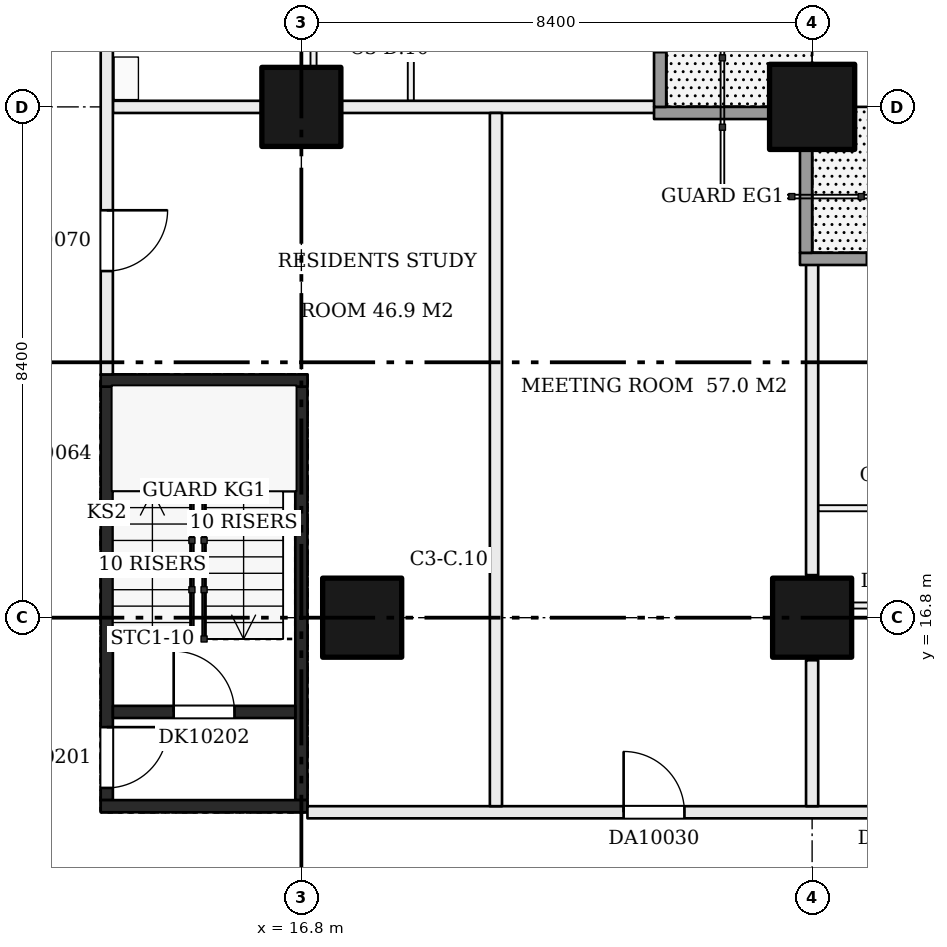
"""IFC4 building model, lengths in metres.
Left out: names, types, materials, properties, quantities, classifications, styles, units other than length and angle.
Written with IfcOpenShell. Run it as: python <this file> out.ifc"""

import sys

from ifc_helpers import new_model, si_unit, direction, frame, frame_2d, origin, origin_2d, place, context, subcontext, project, spatial, rectangle, extrude, element, fill, save


model = new_model("IFC4")
c1 = context("Model", 3, precision=1e-05, world=origin(), true_north=direction((0.0, 1.0)))
c2 = subcontext(c1, "Body", "Model", "MODEL_VIEW")
j1 = project(units=[si_unit("LENGTHUNIT", "METRE"), si_unit("PLANEANGLEUNIT", "RADIAN")], contexts=[c1])
p1 = place(None, origin())
s1 = spatial("IfcSite", under=j1, at=p1, CompositionType="ELEMENT")
p2 = place(p1, origin())
s2 = spatial("IfcBuilding", under=s1, at=p2, CompositionType="ELEMENT")
p3 = place(p2, frame((0.0, 0.0, 46.2)))
s3 = spatial("IfcBuildingStorey", under=s2, at=p3, CompositionType="ELEMENT", Elevation=46.2)
for number, where, z_axis, x_axis in (
    (1, (17.8, 16.8, 0.0), (0.0, 0.0, 1.0), (1.0, 0.0, 0.0)),
    (2, (16.8, 25.2, 0.0), (0.0, 0.0, 1.0), (1.0, 0.0, 0.0)),
    (3, (25.2, 16.8, 0.0), (0.0, 0.0, 1.0), (1.0, 0.0, 0.0)),
):
    element("IfcColumn", number, at=place(p3, frame(where, z_axis=z_axis, x_axis=x_axis)), inside=s3, PredefinedType="COLUMN", context=c2, shape_type="SweptSolid", body=[
        extrude(rectangle(XDim=1.3, YDim=1.3, at=origin_2d()), origin(), (0.0, 0.0, 1.0), 3.22),
    ])
p4 = place(p3, frame((25.2, 25.2, 0.0), z_axis=(0.0, 0.0, 1.0), x_axis=(1.0, 0.0, 0.0)))
e4 = element("IfcColumn", 4, at=p4, inside=s3, PredefinedType="COLUMN", context=c2, shape_type="SweptSolid", body=[
    extrude(rectangle(XDim=1.4, YDim=1.4, at=origin_2d()), origin(), (0.0, 0.0, 1.0), 3.22),
])
p5 = place(p3, frame((13.6, 13.8, 0.0), z_axis=(0.0, 0.0, 1.0), x_axis=(0.0, 1.0, 0.0)))
e5 = element("IfcWall", 5, at=p5, inside=s3, PredefinedType="SHEAR", context=c2, shape_type="SweptSolid", body=[
    extrude(rectangle(XDim=6.8, YDim=0.2, at=frame_2d((3.4, 0.0))), origin(), (0.0, 0.0, 1.0), 3.22),
])
p6 = place(p5, frame((0.2, 0.0, 0.0)))
e6 = element("IfcOpeningElement", 6, at=p6, cuts=e5, PredefinedType="OPENING", context=c2, shape_type="SweptSolid", body=[
    extrude(rectangle(XDim=1.0, YDim=2.1, at=frame_2d((0.5, 1.05))), frame((0.0, 0.11, 0.0), z_axis=(0.0, -1.0, 0.0), x_axis=(1.0, 0.0, 0.0)), (0.0, 0.0, 1.0), 0.22),
])
p7 = place(p3, frame((16.8, 13.8, 0.0), z_axis=(0.0, 0.0, 1.0), x_axis=(0.0, 1.0, 0.0)))
e7 = element("IfcWall", 7, at=p7, inside=s3, PredefinedType="SHEAR", context=c2, shape_type="SweptSolid", body=[
    extrude(rectangle(XDim=6.8, YDim=0.2, at=frame_2d((3.4, 0.0))), origin(), (0.0, 0.0, 1.0), 3.22),
])
for number, where, z_axis, x_axis in (
    (8, (13.5, 13.7, 0.0), (0.0, 0.0, 1.0), (1.0, 0.0, 0.0)),
    (9, (13.5, 20.7, 0.0), (0.0, 0.0, 1.0), (1.0, 0.0, 0.0)),
):
    element("IfcWall", number, at=place(p3, frame(where, z_axis=z_axis, x_axis=x_axis)), inside=s3, PredefinedType="SHEAR", context=c2, shape_type="SweptSolid", body=[
        extrude(rectangle(XDim=3.4, YDim=0.2, at=frame_2d((1.7, 0.0))), origin(), (0.0, 0.0, 1.0), 3.22),
    ])
p8 = place(p3, frame((13.7, 15.25, 0.0), z_axis=(0.0, 0.0, 1.0), x_axis=(1.0, 0.0, 0.0)))
e10 = element("IfcWall", 10, at=p8, inside=s3, PredefinedType="SHEAR", context=c2, shape_type="SweptSolid", body=[
    extrude(rectangle(XDim=3.0, YDim=0.2, at=frame_2d((1.5, 0.0))), origin(), (0.0, 0.0, 1.0), 3.22),
])
p9 = place(p8, frame((1.0, 0.0, 0.0)))
e11 = element("IfcOpeningElement", 11, at=p9, cuts=e10, PredefinedType="OPENING", context=c2, shape_type="SweptSolid", body=[
    extrude(rectangle(XDim=1.0, YDim=2.1, at=frame_2d((0.5, 1.05))), frame((0.0, 0.11, 0.0), z_axis=(0.0, -1.0, 0.0), x_axis=(1.0, 0.0, 0.0)), (0.0, 0.0, 1.0), 0.22),
])
p10 = place(p3, frame((16.9, 13.6, 0.0), z_axis=(0.0, 0.0, 1.0), x_axis=(1.0, 0.0, 0.0)))
e12 = element("IfcWall", 12, at=p10, inside=s3, PredefinedType="PARTITIONING", context=c2, shape_type="SweptSolid", body=[
    extrude(rectangle(XDim=25.1, YDim=0.2, at=frame_2d((12.55, 0.0))), origin(), (0.0, 0.0, 1.0), 3.22),
])
p11 = place(p10, frame((9.3, 0.0, 0.0)))
e13 = element("IfcOpeningElement", 13, at=p11, cuts=e12, PredefinedType="OPENING", context=c2, shape_type="SweptSolid", body=[
    extrude(rectangle(XDim=1.0, YDim=2.1, at=frame_2d((0.5, 1.05))), frame((0.0, 0.11, 0.0), z_axis=(0.0, -1.0, 0.0), x_axis=(1.0, 0.0, 0.0)), (0.0, 0.0, 1.0), 0.22),
])
p12 = place(p10, frame((21.4, 0.0, 0.0)))
e14 = element("IfcOpeningElement", 14, at=p12, cuts=e12, PredefinedType="OPENING", context=c2, shape_type="SweptSolid", body=[
    extrude(rectangle(XDim=1.0, YDim=2.1, at=frame_2d((0.5, 1.05))), frame((0.0, 0.11, 0.0), z_axis=(0.0, -1.0, 0.0), x_axis=(1.0, 0.0, 0.0)), (0.0, 0.0, 1.0), 0.22),
])
p13 = place(p10, frame((5.2, 0.0, 0.0)))
e15 = element("IfcOpeningElement", 15, at=p13, cuts=e12, PredefinedType="OPENING", context=c2, shape_type="SweptSolid", body=[
    extrude(rectangle(XDim=1.0, YDim=2.1, at=frame_2d((0.5, 1.05))), frame((0.0, 0.11, 0.0), z_axis=(0.0, -1.0, 0.0), x_axis=(1.0, 0.0, 0.0)), (0.0, 0.0, 1.0), 0.22),
])
p14 = place(p3, frame((25.3, 17.0, 0.0), z_axis=(0.0, 0.0, 1.0), x_axis=(1.0, 0.0, 0.0)))
e16 = element("IfcWall", 16, at=p14, inside=s3, PredefinedType="PARTITIONING", context=c2, shape_type="SweptSolid", body=[
    extrude(rectangle(XDim=12.4, YDim=0.1, at=frame_2d((6.2, 0.0))), origin(), (0.0, 0.0, 1.0), 3.22),
])
p15 = place(p14, frame((1.0, 0.0, 0.0)))
e17 = element("IfcOpeningElement", 17, at=p15, cuts=e16, PredefinedType="OPENING", context=c2, shape_type="SweptSolid", body=[
    extrude(rectangle(XDim=0.9, YDim=2.1, at=frame_2d((0.45, 1.05))), frame((0.0, 0.06, 0.0), z_axis=(0.0, -1.0, 0.0), x_axis=(1.0, 0.0, 0.0)), (0.0, 0.0, 1.0), 0.12),
])
p16 = place(p14, frame((4.0, 0.0, 0.0)))
e18 = element("IfcOpeningElement", 18, at=p16, cuts=e16, PredefinedType="OPENING", context=c2, shape_type="SweptSolid", body=[
    extrude(rectangle(XDim=0.9, YDim=2.1, at=frame_2d((0.45, 1.05))), frame((0.0, 0.06, 0.0), z_axis=(0.0, -1.0, 0.0), x_axis=(1.0, 0.0, 0.0)), (0.0, 0.0, 1.0), 0.12),
])
p17 = place(p14, frame((6.5, 0.0, 0.0)))
e19 = element("IfcOpeningElement", 19, at=p17, cuts=e16, PredefinedType="OPENING", context=c2, shape_type="SweptSolid", body=[
    extrude(rectangle(XDim=0.9, YDim=2.1, at=frame_2d((0.45, 1.05))), frame((0.0, 0.06, 0.0), z_axis=(0.0, -1.0, 0.0), x_axis=(1.0, 0.0, 0.0)), (0.0, 0.0, 1.0), 0.12),
])
p18 = place(p14, frame((10.7, 0.0, 0.0)))
e20 = element("IfcOpeningElement", 20, at=p18, cuts=e16, PredefinedType="OPENING", context=c2, shape_type="SweptSolid", body=[
    extrude(rectangle(XDim=0.9, YDim=2.1, at=frame_2d((0.45, 1.05))), frame((0.0, 0.06, 0.0), z_axis=(0.0, -1.0, 0.0), x_axis=(1.0, 0.0, 0.0)), (0.0, 0.0, 1.0), 0.12),
])
p19 = place(p3, frame((25.3, 18.6, 0.0), z_axis=(0.0, 0.0, 1.0), x_axis=(1.0, 0.0, 0.0)))
e21 = element("IfcWall", 21, at=p19, inside=s3, PredefinedType="PARTITIONING", context=c2, shape_type="SweptSolid", body=[
    extrude(rectangle(XDim=12.4, YDim=0.1, at=frame_2d((6.2, 0.0))), origin(), (0.0, 0.0, 1.0), 3.22),
])
p20 = place(p19, frame((1.5, 0.0, 0.0)))
e22 = element("IfcOpeningElement", 22, at=p20, cuts=e21, PredefinedType="OPENING", context=c2, shape_type="SweptSolid", body=[
    extrude(rectangle(XDim=0.9, YDim=2.1, at=frame_2d((0.45, 1.05))), frame((0.0, 0.06, 0.0), z_axis=(0.0, -1.0, 0.0), x_axis=(1.0, 0.0, 0.0)), (0.0, 0.0, 1.0), 0.12),
])
p21 = place(p19, frame((5.7, 0.0, 0.0)))
e23 = element("IfcOpeningElement", 23, at=p21, cuts=e21, PredefinedType="OPENING", context=c2, shape_type="SweptSolid", body=[
    extrude(rectangle(XDim=0.9, YDim=2.1, at=frame_2d((0.45, 1.05))), frame((0.0, 0.06, 0.0), z_axis=(0.0, -1.0, 0.0), x_axis=(1.0, 0.0, 0.0)), (0.0, 0.0, 1.0), 0.12),
])
p22 = place(p19, frame((9.9, 0.0, 0.0)))
e24 = element("IfcOpeningElement", 24, at=p22, cuts=e21, PredefinedType="OPENING", context=c2, shape_type="SweptSolid", body=[
    extrude(rectangle(XDim=0.9, YDim=2.1, at=frame_2d((0.45, 1.05))), frame((0.0, 0.06, 0.0), z_axis=(0.0, -1.0, 0.0), x_axis=(1.0, 0.0, 0.0)), (0.0, 0.0, 1.0), 0.12),
])
p23 = place(p3, frame((13.7, 25.2, 0.0), z_axis=(0.0, 0.0, 1.0), x_axis=(1.0, 0.0, 0.0)))
e25 = element("IfcWall", 25, at=p23, inside=s3, PredefinedType="PARTITIONING", context=c2, shape_type="SweptSolid", body=[
    extrude(rectangle(XDim=9.0, YDim=0.2, at=frame_2d((4.5, 0.0))), origin(), (0.0, 0.0, 1.0), 3.22),
])
p24 = place(p3, frame((13.6, 20.8, 0.0), z_axis=(0.0, 0.0, 1.0), x_axis=(0.0, 1.0, 0.0)))
e26 = element("IfcWall", 26, at=p24, inside=s3, PredefinedType="PARTITIONING", context=c2, shape_type="SweptSolid", body=[
    extrude(rectangle(XDim=21.2, YDim=0.2, at=frame_2d((10.6, 0.0))), origin(), (0.0, 0.0, 1.0), 3.22),
])
p25 = place(p24, frame((8.6, 0.0, 0.0)))
e27 = element("IfcOpeningElement", 27, at=p25, cuts=e26, PredefinedType="OPENING", context=c2, shape_type="SweptSolid", body=[
    extrude(rectangle(XDim=1.0, YDim=2.1, at=frame_2d((0.5, 1.05))), frame((0.0, 0.11, 0.0), z_axis=(0.0, -1.0, 0.0), x_axis=(1.0, 0.0, 0.0)), (0.0, 0.0, 1.0), 0.22),
])
p26 = place(p24, frame((19.74, 0.0, 0.0)))
e28 = element("IfcOpeningElement", 28, at=p26, cuts=e26, PredefinedType="OPENING", context=c2, shape_type="SweptSolid", body=[
    extrude(rectangle(XDim=1.0, YDim=2.1, at=frame_2d((0.5, 1.05))), frame((0.0, 0.11, 0.0), z_axis=(0.0, -1.0, 0.0), x_axis=(1.0, 0.0, 0.0)), (0.0, 0.0, 1.0), 0.22),
])
p27 = place(p24, frame((1.7, 0.0, 0.0)))
e29 = element("IfcOpeningElement", 29, at=p27, cuts=e26, PredefinedType="OPENING", context=c2, shape_type="SweptSolid", body=[
    extrude(rectangle(XDim=1.0, YDim=2.1, at=frame_2d((0.5, 1.05))), frame((0.0, 0.11, 0.0), z_axis=(0.0, -1.0, 0.0), x_axis=(1.0, 0.0, 0.0)), (0.0, 0.0, 1.0), 0.22),
])
p28 = place(p3, frame((17.0, 25.3, 0.0), z_axis=(0.0, 0.0, 1.0), x_axis=(0.0, 1.0, 0.0)))
e30 = element("IfcWall", 30, at=p28, inside=s3, PredefinedType="PARTITIONING", context=c2, shape_type="SweptSolid", body=[
    extrude(rectangle(XDim=12.4, YDim=0.1, at=frame_2d((6.2, 0.0))), origin(), (0.0, 0.0, 1.0), 3.22),
])
p29 = place(p28, frame((4.2, 0.0, 0.0)))
e31 = element("IfcOpeningElement", 31, at=p29, cuts=e30, PredefinedType="OPENING", context=c2, shape_type="SweptSolid", body=[
    extrude(rectangle(XDim=0.9, YDim=2.1, at=frame_2d((0.45, 1.05))), frame((0.0, 0.06, 0.0), z_axis=(0.0, -1.0, 0.0), x_axis=(1.0, 0.0, 0.0)), (0.0, 0.0, 1.0), 0.12),
])
p30 = place(p28, frame((1.0, 0.0, 0.0)))
e32 = element("IfcOpeningElement", 32, at=p30, cuts=e30, PredefinedType="OPENING", context=c2, shape_type="SweptSolid", body=[
    extrude(rectangle(XDim=0.9, YDim=2.1, at=frame_2d((0.45, 1.05))), frame((0.0, 0.06, 0.0), z_axis=(0.0, -1.0, 0.0), x_axis=(1.0, 0.0, 0.0)), (0.0, 0.0, 1.0), 0.12),
])
p31 = place(p28, frame((6.5, 0.0, 0.0)))
e33 = element("IfcOpeningElement", 33, at=p31, cuts=e30, PredefinedType="OPENING", context=c2, shape_type="SweptSolid", body=[
    extrude(rectangle(XDim=0.9, YDim=2.1, at=frame_2d((0.45, 1.05))), frame((0.0, 0.06, 0.0), z_axis=(0.0, -1.0, 0.0), x_axis=(1.0, 0.0, 0.0)), (0.0, 0.0, 1.0), 0.12),
])
p32 = place(p28, frame((10.7, 0.0, 0.0)))
e34 = element("IfcOpeningElement", 34, at=p32, cuts=e30, PredefinedType="OPENING", context=c2, shape_type="SweptSolid", body=[
    extrude(rectangle(XDim=0.9, YDim=2.1, at=frame_2d((0.45, 1.05))), frame((0.0, 0.06, 0.0), z_axis=(0.0, -1.0, 0.0), x_axis=(1.0, 0.0, 0.0)), (0.0, 0.0, 1.0), 0.12),
])
p33 = place(p3, frame((18.6, 25.3, 0.0), z_axis=(0.0, 0.0, 1.0), x_axis=(0.0, 1.0, 0.0)))
e35 = element("IfcWall", 35, at=p33, inside=s3, PredefinedType="PARTITIONING", context=c2, shape_type="SweptSolid", body=[
    extrude(rectangle(XDim=16.7, YDim=0.1, at=frame_2d((8.35, 0.0))), origin(), (0.0, 0.0, 1.0), 3.22),
])
p34 = place(p33, frame((3.6, 0.0, 0.0)))
e36 = element("IfcOpeningElement", 36, at=p34, cuts=e35, PredefinedType="OPENING", context=c2, shape_type="SweptSolid", body=[
    extrude(rectangle(XDim=0.9, YDim=2.1, at=frame_2d((0.45, 1.05))), frame((0.0, 0.06, 0.0), z_axis=(0.0, -1.0, 0.0), x_axis=(1.0, 0.0, 0.0)), (0.0, 0.0, 1.0), 0.12),
])
p35 = place(p33, frame((9.9, 0.0, 0.0)))
e37 = element("IfcOpeningElement", 37, at=p35, cuts=e35, PredefinedType="OPENING", context=c2, shape_type="SweptSolid", body=[
    extrude(rectangle(XDim=0.9, YDim=2.1, at=frame_2d((0.45, 1.05))), frame((0.0, 0.06, 0.0), z_axis=(0.0, -1.0, 0.0), x_axis=(1.0, 0.0, 0.0)), (0.0, 0.0, 1.0), 0.12),
])
p36 = place(p33, frame((15.24, 0.0, 0.0)))
e38 = element("IfcOpeningElement", 38, at=p36, cuts=e35, PredefinedType="OPENING", context=c2, shape_type="SweptSolid", body=[
    extrude(rectangle(XDim=0.9, YDim=2.1, at=frame_2d((0.45, 1.05))), frame((0.0, 0.06, 0.0), z_axis=(0.0, -1.0, 0.0), x_axis=(1.0, 0.0, 0.0)), (0.0, 0.0, 1.0), 0.12),
])
p37 = place(p33, frame((13.2, 0.0, 0.0)))
e39 = element("IfcOpeningElement", 39, at=p37, cuts=e35, PredefinedType="OPENING", context=c2, shape_type="SweptSolid", body=[
    extrude(rectangle(XDim=0.9, YDim=2.1, at=frame_2d((0.45, 1.05))), frame((0.0, 0.06, 0.0), z_axis=(0.0, -1.0, 0.0), x_axis=(1.0, 0.0, 0.0)), (0.0, 0.0, 1.0), 0.12),
])
p38 = place(p3, frame((20.0, 13.7, 0.0), z_axis=(0.0, 0.0, 1.0), x_axis=(0.0, 1.0, 0.0)))
e40 = element("IfcWall", 40, at=p38, inside=s3, PredefinedType="PARTITIONING", context=c2, shape_type="SweptSolid", body=[
    extrude(rectangle(XDim=11.4, YDim=0.2, at=frame_2d((5.7, 0.0))), origin(), (0.0, 0.0, 1.0), 3.22),
])
p39 = place(p3, frame((25.2, 13.7, 0.0), z_axis=(0.0, 0.0, 1.0), x_axis=(0.0, 1.0, 0.0)))
e41 = element("IfcWall", 41, at=p39, inside=s3, PredefinedType="PARTITIONING", context=c2, shape_type="SweptSolid", body=[
    extrude(rectangle(XDim=2.4, YDim=0.2, at=frame_2d((1.2, 0.0))), origin(), (0.0, 0.0, 1.0), 3.22),
])
p40 = place(p3, frame((25.2, 17.5, 0.0), z_axis=(0.0, 0.0, 1.0), x_axis=(0.0, 1.0, 0.0)))
e42 = element("IfcWall", 42, at=p40, inside=s3, PredefinedType="PARTITIONING", context=c2, shape_type="SweptSolid", body=[
    extrude(rectangle(XDim=5.2, YDim=0.2, at=frame_2d((2.6, 0.0))), origin(), (0.0, 0.0, 1.0), 3.22),
])
p41 = place(p3, frame((42.0, 22.7, 0.0), z_axis=(0.0, 0.0, 1.0), x_axis=(-1.0, 0.0, 0.0)))
e43 = element("IfcWall", 43, at=p41, inside=s3, PredefinedType="SOLIDWALL", context=c2, shape_type="SweptSolid", body=[
    extrude(rectangle(XDim=17.0, YDim=0.2, at=frame_2d((8.5, 0.0))), origin(), (0.0, 0.0, 1.0), 3.22),
])
p42 = place(p41, frame((13.5, 0.0, 0.9)))
e44 = element("IfcOpeningElement", 44, at=p42, cuts=e43, PredefinedType="OPENING", context=c2, shape_type="SweptSolid", body=[
    extrude(rectangle(XDim=2.4, YDim=1.5, at=frame_2d((1.2, 0.75))), frame((0.0, 0.11, 0.0), z_axis=(0.0, -1.0, 0.0), x_axis=(1.0, 0.0, 0.0)), (0.0, 0.0, 1.0), 0.22),
])
p43 = place(p41, frame((9.3, 0.0, 0.0)))
e45 = element("IfcOpeningElement", 45, at=p43, cuts=e43, PredefinedType="OPENING", context=c2, shape_type="SweptSolid", body=[
    extrude(rectangle(XDim=2.4, YDim=2.2, at=frame_2d((1.2, 1.1))), frame((0.0, 0.11, 0.0), z_axis=(0.0, -1.0, 0.0), x_axis=(1.0, 0.0, 0.0)), (0.0, 0.0, 1.0), 0.22),
])
p44 = place(p41, frame((5.1, 0.0, 0.9)))
e46 = element("IfcOpeningElement", 46, at=p44, cuts=e43, PredefinedType="OPENING", context=c2, shape_type="SweptSolid", body=[
    extrude(rectangle(XDim=2.4, YDim=1.5, at=frame_2d((1.2, 0.75))), frame((0.0, 0.11, 0.0), z_axis=(0.0, -1.0, 0.0), x_axis=(1.0, 0.0, 0.0)), (0.0, 0.0, 1.0), 0.22),
])
p45 = place(p41, frame((0.9, 0.0, 0.0)))
e47 = element("IfcOpeningElement", 47, at=p45, cuts=e43, PredefinedType="OPENING", context=c2, shape_type="SweptSolid", body=[
    extrude(rectangle(XDim=2.4, YDim=2.2, at=frame_2d((1.2, 1.1))), frame((0.0, 0.11, 0.0), z_axis=(0.0, -1.0, 0.0), x_axis=(1.0, 0.0, 0.0)), (0.0, 0.0, 1.0), 0.22),
])
p46 = place(p3, frame((25.1, 22.8, 0.0), z_axis=(0.0, 0.0, 1.0), x_axis=(0.0, 1.0, 0.0)))
e48 = element("IfcWall", 48, at=p46, inside=s3, PredefinedType="SOLIDWALL", context=c2, shape_type="SweptSolid", body=[
    extrude(rectangle(XDim=1.7, YDim=0.2, at=frame_2d((0.85, 0.0))), origin(), (0.0, 0.0, 1.0), 3.22),
])
p47 = place(p3, frame((24.5, 25.1, 0.0), z_axis=(0.0, 0.0, 1.0), x_axis=(-1.0, 0.0, 0.0)))
e49 = element("IfcWall", 49, at=p47, inside=s3, PredefinedType="SOLIDWALL", context=c2, shape_type="SweptSolid", body=[
    extrude(rectangle(XDim=1.9, YDim=0.2, at=frame_2d((0.95, 0.0))), origin(), (0.0, 0.0, 1.0), 3.22),
])
p48 = place(p3, frame((22.7, 25.2, 0.0), z_axis=(0.0, 0.0, 1.0), x_axis=(0.0, 1.0, 0.0)))
e50 = element("IfcWall", 50, at=p48, inside=s3, PredefinedType="SOLIDWALL", context=c2, shape_type="SweptSolid", body=[
    extrude(rectangle(XDim=16.8, YDim=0.2, at=frame_2d((8.4, 0.0))), origin(), (0.0, 0.0, 1.0), 3.22),
])
p49 = place(p48, frame((0.9, 0.0, 0.0)))
e51 = element("IfcOpeningElement", 51, at=p49, cuts=e50, PredefinedType="OPENING", context=c2, shape_type="SweptSolid", body=[
    extrude(rectangle(XDim=2.4, YDim=2.2, at=frame_2d((1.2, 1.1))), frame((0.0, 0.11, 0.0), z_axis=(0.0, -1.0, 0.0), x_axis=(1.0, 0.0, 0.0)), (0.0, 0.0, 1.0), 0.22),
])
p50 = place(p48, frame((5.1, 0.0, 0.0)))
e52 = element("IfcOpeningElement", 52, at=p50, cuts=e50, PredefinedType="OPENING", context=c2, shape_type="SweptSolid", body=[
    extrude(rectangle(XDim=2.4, YDim=2.2, at=frame_2d((1.2, 1.1))), frame((0.0, 0.11, 0.0), z_axis=(0.0, -1.0, 0.0), x_axis=(1.0, 0.0, 0.0)), (0.0, 0.0, 1.0), 0.22),
])
p51 = place(p48, frame((9.3, 0.0, 0.9)))
e53 = element("IfcOpeningElement", 53, at=p51, cuts=e50, PredefinedType="OPENING", context=c2, shape_type="SweptSolid", body=[
    extrude(rectangle(XDim=2.4, YDim=1.5, at=frame_2d((1.2, 0.75))), frame((0.0, 0.11, 0.0), z_axis=(0.0, -1.0, 0.0), x_axis=(1.0, 0.0, 0.0)), (0.0, 0.0, 1.0), 0.22),
])
p52 = place(p48, frame((13.5, 0.0, 0.0)))
e54 = element("IfcOpeningElement", 54, at=p52, cuts=e50, PredefinedType="OPENING", context=c2, shape_type="SweptSolid", body=[
    extrude(rectangle(XDim=2.4, YDim=2.2, at=frame_2d((1.2, 1.1))), frame((0.0, 0.11, 0.0), z_axis=(0.0, -1.0, 0.0), x_axis=(1.0, 0.0, 0.0)), (0.0, 0.0, 1.0), 0.22),
])
p53 = place(p6, frame((1.0, 0.0, 0.0), z_axis=(0.0, 0.0, 1.0), x_axis=(-1.0, 0.0, 0.0)))
e55 = element("IfcDoor", 55, at=p53, inside=s3, OperationType="SINGLE_SWING_LEFT", PredefinedType="DOOR", context=c2, shape_type="SweptSolid", body=[
    extrude(rectangle(XDim=1.0, YDim=2.1, at=frame_2d((0.5, 1.05))), frame((0.0, 0.025, 0.0), z_axis=(0.0, -1.0, 0.0), x_axis=(1.0, 0.0, 0.0)), (0.0, 0.0, 1.0), 0.05),
])
fill(e6, e55)
p54 = place(p9, origin())
e56 = element("IfcDoor", 56, at=p54, inside=s3, OperationType="SINGLE_SWING_LEFT", PredefinedType="DOOR", context=c2, shape_type="SweptSolid", body=[
    extrude(rectangle(XDim=1.0, YDim=2.1, at=frame_2d((0.5, 1.05))), frame((0.0, 0.025, 0.0), z_axis=(0.0, -1.0, 0.0), x_axis=(1.0, 0.0, 0.0)), (0.0, 0.0, 1.0), 0.05),
])
fill(e11, e56)
p55 = place(p13, origin())
e57 = element("IfcDoor", 57, at=p55, inside=s3, OperationType="SINGLE_SWING_LEFT", PredefinedType="DOOR", context=c2, shape_type="SweptSolid", body=[
    extrude(rectangle(XDim=1.0, YDim=2.1, at=frame_2d((0.5, 1.05))), frame((0.0, 0.025, 0.0), z_axis=(0.0, -1.0, 0.0), x_axis=(1.0, 0.0, 0.0)), (0.0, 0.0, 1.0), 0.05),
])
fill(e15, e57)
p56 = place(p27, frame((1.0, 0.0, 0.0), z_axis=(0.0, 0.0, 1.0), x_axis=(-1.0, 0.0, 0.0)))
e58 = element("IfcDoor", 58, at=p56, inside=s3, OperationType="SINGLE_SWING_LEFT", PredefinedType="DOOR", context=c2, shape_type="SweptSolid", body=[
    extrude(rectangle(XDim=1.0, YDim=2.1, at=frame_2d((0.5, 1.05))), frame((0.0, 0.025, 0.0), z_axis=(0.0, -1.0, 0.0), x_axis=(1.0, 0.0, 0.0)), (0.0, 0.0, 1.0), 0.05),
])
fill(e29, e58)
p57 = place(p49, origin())
e59 = element("IfcDoor", 59, at=p57, inside=s3, OperationType="DOUBLE_DOOR_SLIDING", PredefinedType="DOOR", context=c2, shape_type="SweptSolid", body=[
    extrude(rectangle(XDim=2.4, YDim=2.2, at=frame_2d((1.2, 1.1))), frame((0.0, 0.025, 0.0), z_axis=(0.0, -1.0, 0.0), x_axis=(1.0, 0.0, 0.0)), (0.0, 0.0, 1.0), 0.05),
])
fill(e51, e59)
save(model, sys.argv[1])
